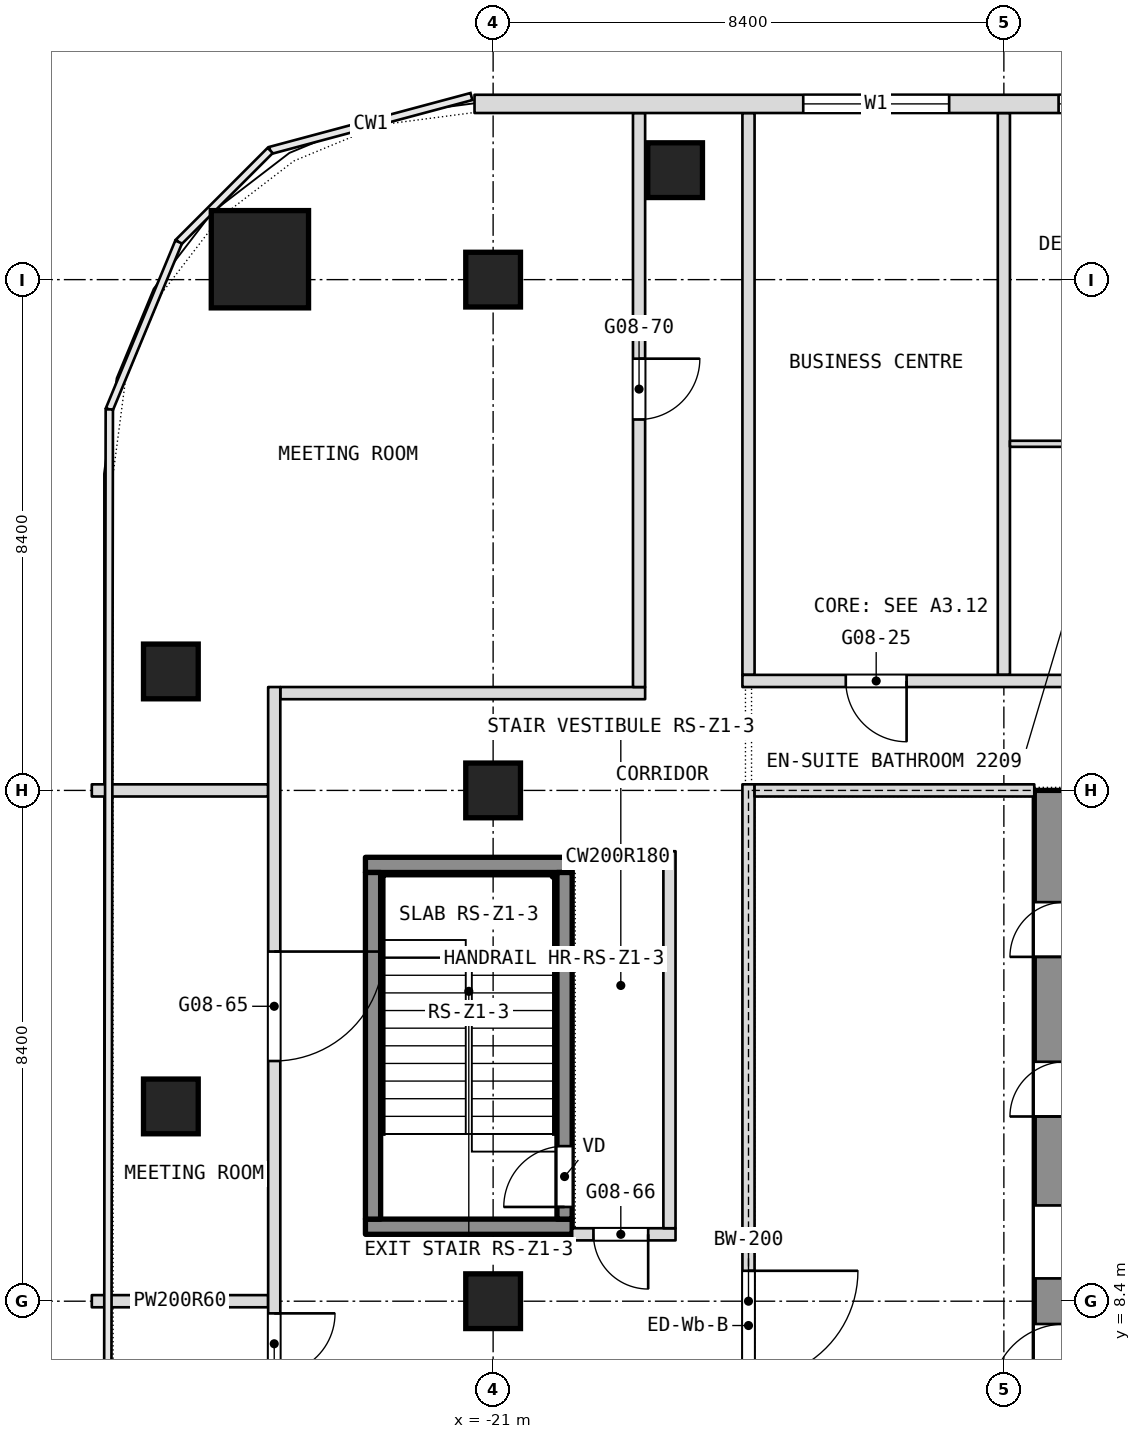
"""IFC4 building model, lengths in metres.
Left out: names, types, materials, properties, quantities, classifications, styles, units other than length and angle.
Written with IfcOpenShell. Run it as: python <this file> out.ifc"""

import sys

from ifc_helpers import new_model, si_unit, direction, frame, frame_2d, origin, origin_2d, place, context, subcontext, project, spatial, rectangle, extrude, element, fill, save


model = new_model("IFC4")
c1 = context("Model", 3, precision=1e-05, world=origin(), true_north=direction((0.0, 1.0)))
c2 = subcontext(c1, "Body", "Model", "MODEL_VIEW")
j1 = project(units=[si_unit("LENGTHUNIT", "METRE"), si_unit("PLANEANGLEUNIT", "RADIAN")], contexts=[c1])
p1 = place(None, origin())
s1 = spatial("IfcSite", under=j1, at=p1, CompositionType="ELEMENT")
p2 = place(p1, origin())
s2 = spatial("IfcBuilding", under=s1, at=p2, CompositionType="ELEMENT")
p3 = place(p2, frame((0.0, 0.0, 104.9)))
s3 = spatial("IfcBuildingStorey", under=s2, at=p3, CompositionType="ELEMENT", Elevation=104.9)
p4 = place(p3, frame((-11.6, 0.0, 0.0), z_axis=(0.0, 0.0, 1.0), x_axis=(0.0, 1.0, 0.0)))
e1 = element("IfcWall", 1, at=p4, inside=s3, PredefinedType="SHEAR", context=c2, shape_type="SweptSolid", body=[
    extrude(rectangle(XDim=16.8, YDim=1.0, at=frame_2d((8.4, 0.0))), origin(), (0.0, 0.0, 1.0), 3.6),
])
p5 = place(p4, frame((3.6, 0.0, 0.0)))
e2 = element("IfcOpeningElement", 2, at=p5, cuts=e1, PredefinedType="OPENING", context=c2, shape_type="SweptSolid", body=[
    extrude(rectangle(XDim=0.9, YDim=2.1, at=frame_2d((0.45, 1.05))), frame((0.0, 0.5, 0.0), z_axis=(0.0, -1.0, 0.0), x_axis=(1.0, 0.0, 0.0)), (0.0, 0.0, 1.0), 1.0),
])
p6 = place(p4, frame((6.825, 0.0, 0.0)))
e3 = element("IfcOpeningElement", 3, at=p6, cuts=e1, PredefinedType="OPENING", context=c2, shape_type="SweptSolid", body=[
    extrude(rectangle(XDim=1.2, YDim=2.1, at=frame_2d((0.6, 1.05))), frame((0.0, 0.5, 0.0), z_axis=(0.0, -1.0, 0.0), x_axis=(1.0, 0.0, 0.0)), (0.0, 0.0, 1.0), 1.0),
])
p7 = place(p4, frame((14.062, 0.0, 0.0)))
e4 = element("IfcOpeningElement", 4, at=p7, cuts=e1, PredefinedType="OPENING", context=c2, shape_type="SweptSolid", body=[
    extrude(rectangle(XDim=0.9, YDim=2.1, at=frame_2d((0.45, 1.05))), frame((0.0, 0.5, 0.0), z_axis=(0.0, -1.0, 0.0), x_axis=(1.0, 0.0, 0.0)), (0.0, 0.0, 1.0), 1.0),
])
p8 = place(p4, frame((11.438, 0.0, 0.0)))
e5 = element("IfcOpeningElement", 5, at=p8, cuts=e1, PredefinedType="OPENING", context=c2, shape_type="SweptSolid", body=[
    extrude(rectangle(XDim=0.9, YDim=2.1, at=frame_2d((0.45, 1.05))), frame((0.0, 0.5, 0.0), z_axis=(0.0, -1.0, 0.0), x_axis=(1.0, 0.0, 0.0)), (0.0, 0.0, 1.0), 1.0),
])
p9 = place(p4, frame((8.775, 0.0, 0.0)))
e6 = element("IfcOpeningElement", 6, at=p9, cuts=e1, PredefinedType="OPENING", context=c2, shape_type="SweptSolid", body=[
    extrude(rectangle(XDim=1.2, YDim=2.1, at=frame_2d((0.6, 1.05))), frame((0.0, 0.5, 0.0), z_axis=(0.0, -1.0, 0.0), x_axis=(1.0, 0.0, 0.0)), (0.0, 0.0, 1.0), 1.0),
])
p10 = place(p3, frame((-24.835, 25.535, 0.0), z_axis=(0.0, 0.0, 1.0), x_axis=(1.0, 0.0, 0.0)))
e7 = element("IfcColumn", 7, at=p10, inside=s3, PredefinedType="COLUMN", context=c2, shape_type="SweptSolid", body=[
    extrude(rectangle(XDim=1.6, YDim=1.6, at=origin_2d()), origin(), (0.0, 0.0, 1.0), 3.6),
])
for number, where, z_axis, x_axis in (
    (8, (-21.0, 8.4, 0.0), (0.0, 0.0, 1.0), (1.0, 0.0, 0.0)),
    (9, (-21.0, 16.8, 0.0), (0.0, 0.0, 1.0), (1.0, 0.0, 0.0)),
    (10, (-21.0, 25.2, 0.0), (0.0, 0.0, 1.0), (1.0, 0.0, 0.0)),
    (11, (-26.3, 11.603, 0.0), (0.0, 0.0, 1.0), (1.0, 0.0, 0.0)),
    (12, (-26.3, 18.756, 0.0), (0.0, 0.0, 1.0), (1.0, 0.0, 0.0)),
    (13, (-18.007, 27.0, 0.0), (0.0, 0.0, 1.0), (1.0, 0.0, 0.0)),
):
    element("IfcColumn", number, at=place(p3, frame(where, z_axis=z_axis, x_axis=x_axis)), inside=s3, PredefinedType="COLUMN", context=c2, shape_type="SweptSolid", body=[
        extrude(rectangle(XDim=0.9, YDim=0.9, at=origin_2d()), origin(), (0.0, 0.0, 1.0), 3.6),
    ])
p11 = place(p3, frame((-27.6, 8.4, 0.0), z_axis=(0.0, 0.0, 1.0), x_axis=(1.0, 0.0, 0.0)))
e14 = element("IfcWall", 14, at=p11, inside=s3, PredefinedType="PARTITIONING", context=c2, shape_type="SweptSolid", body=[
    extrude(rectangle(XDim=2.9, YDim=0.2, at=frame_2d((1.45, 0.0))), origin(), (0.0, 0.0, 1.0), 2.89),
])
p12 = place(p3, frame((-19.7, 9.5, 0.0), z_axis=(0.0, 0.0, 1.0), x_axis=(1.0, 0.0, 0.0)))
e15 = element("IfcWall", 15, at=p12, inside=s3, PredefinedType="PARTITIONING", context=c2, shape_type="SweptSolid", body=[
    extrude(rectangle(XDim=1.7, YDim=0.2, at=frame_2d((0.85, 0.0))), origin(), (0.0, 0.0, 1.0), 3.34),
])
p13 = place(p12, frame((0.35, 0.0, 0.0)))
e16 = element("IfcOpeningElement", 16, at=p13, cuts=e15, PredefinedType="OPENING", context=c2, shape_type="SweptSolid", body=[
    extrude(rectangle(XDim=0.9, YDim=2.1, at=frame_2d((0.45, 1.05))), frame((0.0, 0.1, 0.0), z_axis=(0.0, -1.0, 0.0), x_axis=(1.0, 0.0, 0.0)), (0.0, 0.0, 1.0), 0.2),
])
p14 = place(p3, frame((-12.6, 18.7, 0.0), z_axis=(0.0, 0.0, 1.0), x_axis=(0.0, 1.0, 0.0)))
e17 = element("IfcWall", 17, at=p14, inside=s3, PredefinedType="PARTITIONING", context=c2, shape_type="SweptSolid", body=[
    extrude(rectangle(XDim=9.24, YDim=0.2, at=frame_2d((4.62, 0.0))), origin(), (0.0, 0.0, 1.0), 3.34),
])
p15 = place(p3, frame((-19.7, 15.7, 0.0), z_axis=(0.0, 0.0, 1.0), x_axis=(1.0, 0.0, 0.0)))
e18 = element("IfcWall", 18, at=p15, inside=s3, PredefinedType="PARTITIONING", context=c2, shape_type="SweptSolid", body=[
    extrude(rectangle(XDim=1.5, YDim=0.2, at=frame_2d((0.75, 0.0))), origin(), (0.0, 0.0, 1.0), 3.34),
])
p16 = place(p3, frame((-16.8, 18.7, 0.0), z_axis=(0.0, 0.0, 1.0), x_axis=(0.0, 1.0, 0.0)))
e19 = element("IfcWall", 19, at=p16, inside=s3, PredefinedType="PARTITIONING", context=c2, shape_type="SweptSolid", body=[
    extrude(rectangle(XDim=9.24, YDim=0.2, at=frame_2d((4.62, 0.0))), origin(), (0.0, 0.0, 1.0), 3.34),
])
p17 = place(p3, frame((-27.6, 16.8, 0.0), z_axis=(0.0, 0.0, 1.0), x_axis=(1.0, 0.0, 0.0)))
e20 = element("IfcWall", 20, at=p17, inside=s3, PredefinedType="PARTITIONING", context=c2, shape_type="SweptSolid", body=[
    extrude(rectangle(XDim=2.9, YDim=0.2, at=frame_2d((1.45, 0.0))), origin(), (0.0, 0.0, 1.0), 2.89),
])
p18 = place(p3, frame((-18.1, 9.6, 0.0), z_axis=(0.0, 0.0, 1.0), x_axis=(0.0, 1.0, 0.0)))
e21 = element("IfcWall", 21, at=p18, inside=s3, PredefinedType="PARTITIONING", context=c2, shape_type="SweptSolid", body=[
    extrude(rectangle(XDim=6.2, YDim=0.2, at=frame_2d((3.1, 0.0))), origin(), (0.0, 0.0, 1.0), 3.34),
])
p19 = place(p3, frame((-24.5, 18.4, 0.0), z_axis=(0.0, 0.0, 1.0), x_axis=(1.0, 0.0, 0.0)))
e22 = element("IfcWall", 22, at=p19, inside=s3, PredefinedType="PARTITIONING", context=c2, shape_type="SweptSolid", body=[
    extrude(rectangle(XDim=6.0, YDim=0.2, at=frame_2d((3.0, 0.0))), origin(), (0.0, 0.0, 1.0), 3.34),
])
p20 = place(p3, frame((-18.6, 18.5, 0.0), z_axis=(0.0, 0.0, 1.0), x_axis=(0.0, 1.0, 0.0)))
e23 = element("IfcWall", 23, at=p20, inside=s3, PredefinedType="PARTITIONING", context=c2, shape_type="SweptSolid", body=[
    extrude(rectangle(XDim=9.44, YDim=0.2, at=frame_2d((4.72, 0.0))), origin(), (0.0, 0.0, 1.0), 3.34),
])
p21 = place(p20, frame((4.4, 0.0, 0.0)))
e24 = element("IfcOpeningElement", 24, at=p21, cuts=e23, PredefinedType="OPENING", context=c2, shape_type="SweptSolid", body=[
    extrude(rectangle(XDim=1.0, YDim=2.1, at=frame_2d((0.5, 1.05))), frame((0.0, 0.1, 0.0), z_axis=(0.0, -1.0, 0.0), x_axis=(1.0, 0.0, 0.0)), (0.0, 0.0, 1.0), 0.2),
])
p22 = place(p3, frame((-16.9, 18.6, 0.0), z_axis=(0.0, 0.0, 1.0), x_axis=(1.0, 0.0, 0.0)))
e25 = element("IfcWall", 25, at=p22, inside=s3, PredefinedType="PARTITIONING", context=c2, shape_type="SweptSolid", body=[
    extrude(rectangle(XDim=18.4, YDim=0.2, at=frame_2d((9.2, 0.0))), origin(), (0.0, 0.0, 1.0), 3.34),
])
p23 = place(p22, frame((1.7, 0.0, 0.0)))
e26 = element("IfcOpeningElement", 26, at=p23, cuts=e25, PredefinedType="OPENING", context=c2, shape_type="SweptSolid", body=[
    extrude(rectangle(XDim=1.0, YDim=2.1, at=frame_2d((0.5, 1.05))), frame((0.0, 0.1, 0.0), z_axis=(0.0, -1.0, 0.0), x_axis=(1.0, 0.0, 0.0)), (0.0, 0.0, 1.0), 0.2),
])
p24 = place(p22, frame((7.1, 0.0, 0.0)))
e27 = element("IfcOpeningElement", 27, at=p24, cuts=e25, PredefinedType="OPENING", context=c2, shape_type="SweptSolid", body=[
    extrude(rectangle(XDim=1.0, YDim=2.1, at=frame_2d((0.5, 1.05))), frame((0.0, 0.1, 0.0), z_axis=(0.0, -1.0, 0.0), x_axis=(1.0, 0.0, 0.0)), (0.0, 0.0, 1.0), 0.2),
])
p25 = place(p22, frame((8.9, 0.0, 0.0)))
e28 = element("IfcOpeningElement", 28, at=p25, cuts=e25, PredefinedType="OPENING", context=c2, shape_type="SweptSolid", body=[
    extrude(rectangle(XDim=1.0, YDim=2.1, at=frame_2d((0.5, 1.05))), frame((0.0, 0.1, 0.0), z_axis=(0.0, -1.0, 0.0), x_axis=(1.0, 0.0, 0.0)), (0.0, 0.0, 1.0), 0.2),
])
p26 = place(p22, frame((13.1, 0.0, 0.0)))
e29 = element("IfcOpeningElement", 29, at=p26, cuts=e25, PredefinedType="OPENING", context=c2, shape_type="SweptSolid", body=[
    extrude(rectangle(XDim=1.0, YDim=2.1, at=frame_2d((0.5, 1.05))), frame((0.0, 0.1, 0.0), z_axis=(0.0, -1.0, 0.0), x_axis=(1.0, 0.0, 0.0)), (0.0, 0.0, 1.0), 0.2),
])
p27 = place(p3, frame((-12.5, 22.5, 0.0), z_axis=(0.0, 0.0, 1.0), x_axis=(1.0, 0.0, 0.0)))
e30 = element("IfcWall", 30, at=p27, inside=s3, PredefinedType="PARTITIONING", context=c2, shape_type="SweptSolid", body=[
    extrude(rectangle(XDim=2.25, YDim=0.1, at=frame_2d((1.125, 0.0))), origin(), (0.0, 0.0, 1.0), 3.34),
])
p28 = place(p27, frame((1.2, 0.0, 0.0)))
e31 = element("IfcOpeningElement", 31, at=p28, cuts=e30, PredefinedType="OPENING", context=c2, shape_type="SweptSolid", body=[
    extrude(rectangle(XDim=0.9, YDim=2.1, at=frame_2d((0.45, 1.05))), frame((0.0, 0.05, 0.0), z_axis=(0.0, -1.0, 0.0), x_axis=(1.0, 0.0, 0.0)), (0.0, 0.0, 1.0), 0.1),
])
p29 = place(p3, frame((-24.6, 6.9, 0.0), z_axis=(0.0, 0.0, 1.0), x_axis=(0.0, 1.0, 0.0)))
e32 = element("IfcWall", 32, at=p29, inside=s3, PredefinedType="PARTITIONING", context=c2, shape_type="SweptSolid", body=[
    extrude(rectangle(XDim=11.6, YDim=0.2, at=frame_2d((5.8, 0.0))), origin(), (0.0, 0.0, 1.0), 3.34),
])
p30 = place(p29, frame((5.45, 0.0, 0.0)))
e33 = element("IfcOpeningElement", 33, at=p30, cuts=e32, PredefinedType="OPENING", context=c2, shape_type="SweptSolid", body=[
    extrude(rectangle(XDim=1.8, YDim=2.1, at=frame_2d((0.9, 1.05))), frame((0.0, 0.1, 0.0), z_axis=(0.0, -1.0, 0.0), x_axis=(1.0, 0.0, 0.0)), (0.0, 0.0, 1.0), 0.2),
])
p31 = place(p29, frame((0.3, 0.0, 0.0)))
e34 = element("IfcOpeningElement", 34, at=p31, cuts=e32, PredefinedType="OPENING", context=c2, shape_type="SweptSolid", body=[
    extrude(rectangle(XDim=1.0, YDim=2.1, at=frame_2d((0.5, 1.05))), frame((0.0, 0.1, 0.0), z_axis=(0.0, -1.0, 0.0), x_axis=(1.0, 0.0, 0.0)), (0.0, 0.0, 1.0), 0.2),
])
p32 = place(p3, frame((21.306, 28.09, 0.0), z_axis=(0.0, 0.0, 1.0), x_axis=(-1.0, 0.0, 0.0)))
e35 = element("IfcWall", 35, at=p32, inside=s3, PredefinedType="NOTDEFINED", context=c2, shape_type="SweptSolid", body=[
    extrude(rectangle(XDim=42.612, YDim=0.3, at=frame_2d((21.306, 0.0))), origin(), (0.0, 0.0, 1.0), 3.6),
])
p33 = place(p32, frame((5.406, 0.0, 0.9)))
e36 = element("IfcOpeningElement", 36, at=p33, cuts=e35, PredefinedType="OPENING", context=c2, shape_type="SweptSolid", body=[
    extrude(rectangle(XDim=2.4, YDim=2.1, at=frame_2d((1.2, 1.05))), frame((0.0, 0.15, 0.0), z_axis=(0.0, -1.0, 0.0), x_axis=(1.0, 0.0, 0.0)), (0.0, 0.0, 1.0), 0.3),
])
p34 = place(p32, frame((9.606, 0.0, 0.9)))
e37 = element("IfcOpeningElement", 37, at=p34, cuts=e35, PredefinedType="OPENING", context=c2, shape_type="SweptSolid", body=[
    extrude(rectangle(XDim=2.4, YDim=2.1, at=frame_2d((1.2, 1.05))), frame((0.0, 0.15, 0.0), z_axis=(0.0, -1.0, 0.0), x_axis=(1.0, 0.0, 0.0)), (0.0, 0.0, 1.0), 0.3),
])
p35 = place(p32, frame((13.806, 0.0, 0.9)))
e38 = element("IfcOpeningElement", 38, at=p35, cuts=e35, PredefinedType="OPENING", context=c2, shape_type="SweptSolid", body=[
    extrude(rectangle(XDim=2.4, YDim=2.1, at=frame_2d((1.2, 1.05))), frame((0.0, 0.15, 0.0), z_axis=(0.0, -1.0, 0.0), x_axis=(1.0, 0.0, 0.0)), (0.0, 0.0, 1.0), 0.3),
])
p36 = place(p32, frame((18.006, 0.0, 0.9)))
e39 = element("IfcOpeningElement", 39, at=p36, cuts=e35, PredefinedType="OPENING", context=c2, shape_type="SweptSolid", body=[
    extrude(rectangle(XDim=2.4, YDim=2.1, at=frame_2d((1.2, 1.05))), frame((0.0, 0.15, 0.0), z_axis=(0.0, -1.0, 0.0), x_axis=(1.0, 0.0, 0.0)), (0.0, 0.0, 1.0), 0.3),
])
p37 = place(p32, frame((22.206, 0.0, 0.9)))
e40 = element("IfcOpeningElement", 40, at=p37, cuts=e35, PredefinedType="OPENING", context=c2, shape_type="SweptSolid", body=[
    extrude(rectangle(XDim=2.4, YDim=2.1, at=frame_2d((1.2, 1.05))), frame((0.0, 0.15, 0.0), z_axis=(0.0, -1.0, 0.0), x_axis=(1.0, 0.0, 0.0)), (0.0, 0.0, 1.0), 0.3),
])
p38 = place(p32, frame((26.406, 0.0, 0.9)))
e41 = element("IfcOpeningElement", 41, at=p38, cuts=e35, PredefinedType="OPENING", context=c2, shape_type="SweptSolid", body=[
    extrude(rectangle(XDim=2.4, YDim=2.1, at=frame_2d((1.2, 1.05))), frame((0.0, 0.15, 0.0), z_axis=(0.0, -1.0, 0.0), x_axis=(1.0, 0.0, 0.0)), (0.0, 0.0, 1.0), 0.3),
])
p39 = place(p32, frame((30.606, 0.0, 0.9)))
e42 = element("IfcOpeningElement", 42, at=p39, cuts=e35, PredefinedType="OPENING", context=c2, shape_type="SweptSolid", body=[
    extrude(rectangle(XDim=2.4, YDim=2.1, at=frame_2d((1.2, 1.05))), frame((0.0, 0.15, 0.0), z_axis=(0.0, -1.0, 0.0), x_axis=(1.0, 0.0, 0.0)), (0.0, 0.0, 1.0), 0.3),
])
p40 = place(p32, frame((34.806, 0.0, 0.9)))
e43 = element("IfcOpeningElement", 43, at=p40, cuts=e35, PredefinedType="OPENING", context=c2, shape_type="SweptSolid", body=[
    extrude(rectangle(XDim=2.4, YDim=2.1, at=frame_2d((1.2, 1.05))), frame((0.0, 0.15, 0.0), z_axis=(0.0, -1.0, 0.0), x_axis=(1.0, 0.0, 0.0)), (0.0, 0.0, 1.0), 0.3),
])
p41 = place(p3, frame((-16.8, -0.1, 0.0), z_axis=(0.0, 0.0, 1.0), x_axis=(0.0, 1.0, 0.0)))
e44 = element("IfcWall", 44, at=p41, inside=s3, PredefinedType="PARTITIONING", context=c2, shape_type="SweptSolid", body=[
    extrude(rectangle(XDim=17.0, YDim=0.2, at=frame_2d((8.5, 0.0))), origin(), (0.0, 0.0, 1.0), 3.34),
])
p42 = place(p41, frame((2.2, 0.0, 0.0)))
e45 = element("IfcOpeningElement", 45, at=p42, cuts=e44, PredefinedType="OPENING", context=c2, shape_type="SweptSolid", body=[
    extrude(rectangle(XDim=1.8, YDim=2.1, at=frame_2d((0.9, 1.05))), frame((0.0, 0.1, 0.0), z_axis=(0.0, -1.0, 0.0), x_axis=(1.0, 0.0, 0.0)), (0.0, 0.0, 1.0), 0.2),
])
p43 = place(p41, frame((7.2, 0.0, 0.0)))
e46 = element("IfcOpeningElement", 46, at=p43, cuts=e44, PredefinedType="OPENING", context=c2, shape_type="SweptSolid", body=[
    extrude(rectangle(XDim=1.8, YDim=2.1, at=frame_2d((0.9, 1.05))), frame((0.0, 0.1, 0.0), z_axis=(0.0, -1.0, 0.0), x_axis=(1.0, 0.0, 0.0)), (0.0, 0.0, 1.0), 0.2),
])
p44 = place(p3, frame((-16.7, 16.8, 0.0), z_axis=(0.0, 0.0, 1.0), x_axis=(1.0, 0.0, 0.0)))
e47 = element("IfcWall", 47, at=p44, inside=s3, PredefinedType="PARTITIONING", context=c2, shape_type="SweptSolid", body=[
    extrude(rectangle(XDim=4.6, YDim=0.2, at=frame_2d((2.3, 0.0))), origin(), (0.0, 0.0, 1.0), 2.89),
])
for number, where, z_axis, x_axis in (
    (48, (-23.1, 9.625, 0.1), (0.0, 0.0, 1.0), (1.0, 0.0, 0.0)),
    (49, (-23.1, 15.575, 0.1), (0.0, 0.0, 1.0), (1.0, 0.0, 0.0)),
):
    element("IfcWall", number, at=place(p3, frame(where, z_axis=z_axis, x_axis=x_axis)), inside=s3, PredefinedType="SHEAR", context=c2, shape_type="SweptSolid", body=[
        extrude(rectangle(XDim=3.4, YDim=0.25, at=frame_2d((1.7, 0.0))), origin(), (0.0, 0.0, 1.0), 3.6),
    ])
p45 = place(p3, frame((-22.975, 9.75, 0.1), z_axis=(0.0, 0.0, 1.0), x_axis=(0.0, 1.0, 0.0)))
e50 = element("IfcWall", 50, at=p45, inside=s3, PredefinedType="SHEAR", context=c2, shape_type="SweptSolid", body=[
    extrude(rectangle(XDim=5.7, YDim=0.25, at=frame_2d((2.85, 0.0))), origin(), (0.0, 0.0, 1.0), 3.6),
])
p46 = place(p3, frame((-19.825, 9.75, 0.1), z_axis=(0.0, 0.0, 1.0), x_axis=(0.0, 1.0, 0.0)))
e51 = element("IfcWall", 51, at=p46, inside=s3, PredefinedType="SHEAR", context=c2, shape_type="SweptSolid", body=[
    extrude(rectangle(XDim=5.7, YDim=0.25, at=frame_2d((2.85, 0.0))), origin(), (0.0, 0.0, 1.0), 3.6),
])
p47 = place(p46, frame((0.2, 0.0, 0.0)))
e52 = element("IfcOpeningElement", 52, at=p47, cuts=e51, PredefinedType="OPENING", context=c2, shape_type="SweptSolid", body=[
    extrude(rectangle(XDim=1.0, YDim=2.1, at=frame_2d((0.5, 1.05))), frame((0.0, 0.125, 0.0), z_axis=(0.0, -1.0, 0.0), x_axis=(1.0, 0.0, 0.0)), (0.0, 0.0, 1.0), 0.25),
])
p48 = place(p13, origin())
e53 = element("IfcDoor", 53, at=p48, inside=s3, OperationType="SINGLE_SWING_RIGHT", PredefinedType="DOOR", context=c2, shape_type="SweptSolid", body=[
    extrude(rectangle(XDim=0.9, YDim=2.1, at=frame_2d((0.45, 1.05))), frame((0.0, 0.025, 0.0), z_axis=(0.0, -1.0, 0.0), x_axis=(1.0, 0.0, 0.0)), (0.0, 0.0, 1.0), 0.05),
])
fill(e16, e53)
p49 = place(p21, origin())
e54 = element("IfcDoor", 54, at=p49, inside=s3, OperationType="SINGLE_SWING_RIGHT", PredefinedType="DOOR", context=c2, shape_type="SweptSolid", body=[
    extrude(rectangle(XDim=1.0, YDim=2.1, at=frame_2d((0.5, 1.05))), frame((0.0, 0.025, 0.0), z_axis=(0.0, -1.0, 0.0), x_axis=(1.0, 0.0, 0.0)), (0.0, 0.0, 1.0), 0.05),
])
fill(e24, e54)
p50 = place(p23, origin())
e55 = element("IfcDoor", 55, at=p50, inside=s3, OperationType="SINGLE_SWING_RIGHT", PredefinedType="DOOR", context=c2, shape_type="SweptSolid", body=[
    extrude(rectangle(XDim=1.0, YDim=2.1, at=frame_2d((0.5, 1.05))), frame((0.0, 0.025, 0.0), z_axis=(0.0, -1.0, 0.0), x_axis=(1.0, 0.0, 0.0)), (0.0, 0.0, 1.0), 0.05),
])
fill(e26, e55)
p51 = place(p30, origin())
e56 = element("IfcDoor", 56, at=p51, inside=s3, OperationType="DOUBLE_DOOR_SINGLE_SWING", PredefinedType="DOOR", context=c2, shape_type="SweptSolid", body=[
    extrude(rectangle(XDim=1.8, YDim=2.1, at=frame_2d((0.9, 1.05))), frame((0.0, 0.025, 0.0), z_axis=(0.0, -1.0, 0.0), x_axis=(1.0, 0.0, 0.0)), (0.0, 0.0, 1.0), 0.05),
])
fill(e33, e56)
p52 = place(p31, origin())
e57 = element("IfcDoor", 57, at=p52, inside=s3, OperationType="SINGLE_SWING_LEFT", PredefinedType="DOOR", context=c2, shape_type="SweptSolid", body=[
    extrude(rectangle(XDim=1.0, YDim=2.1, at=frame_2d((0.5, 1.05))), frame((0.0, 0.025, 0.0), z_axis=(0.0, -1.0, 0.0), x_axis=(1.0, 0.0, 0.0)), (0.0, 0.0, 1.0), 0.05),
])
fill(e34, e57)
p53 = place(p39, origin())
e58 = element("IfcWindow", 58, at=p53, inside=s3, PartitioningType="SINGLE_PANEL", PredefinedType="WINDOW", context=c2, shape_type="SweptSolid", body=[
    extrude(rectangle(XDim=2.4, YDim=2.1, at=frame_2d((1.2, 1.05))), frame((0.0, 0.03, 0.0), z_axis=(0.0, -1.0, 0.0), x_axis=(1.0, 0.0, 0.0)), (0.0, 0.0, 1.0), 0.06),
])
fill(e42, e58)
p54 = place(p40, origin())
e59 = element("IfcWindow", 59, at=p54, inside=s3, PartitioningType="SINGLE_PANEL", PredefinedType="WINDOW", context=c2, shape_type="SweptSolid", body=[
    extrude(rectangle(XDim=2.4, YDim=2.1, at=frame_2d((1.2, 1.05))), frame((0.0, 0.03, 0.0), z_axis=(0.0, -1.0, 0.0), x_axis=(1.0, 0.0, 0.0)), (0.0, 0.0, 1.0), 0.06),
])
fill(e43, e59)
p55 = place(p47, origin())
e60 = element("IfcDoor", 60, at=p55, inside=s3, OperationType="SINGLE_SWING_LEFT", PredefinedType="DOOR", context=c2, shape_type="SweptSolid", body=[
    extrude(rectangle(XDim=1.0, YDim=2.1, at=frame_2d((0.5, 1.05))), frame((0.0, 0.025, 0.0), z_axis=(0.0, -1.0, 0.0), x_axis=(1.0, 0.0, 0.0)), (0.0, 0.0, 1.0), 0.05),
])
fill(e52, e60)
p56 = place(p43, origin())
e61 = element("IfcDoor", 61, at=p56, inside=s3, OperationType="DOUBLE_DOOR_SINGLE_SWING", PredefinedType="DOOR", context=c2, shape_type="SweptSolid", body=[
    extrude(rectangle(XDim=1.8, YDim=2.1, at=frame_2d((0.9, 1.05))), frame((0.0, 0.025, 0.0), z_axis=(0.0, -1.0, 0.0), x_axis=(1.0, 0.0, 0.0)), (0.0, 0.0, 1.0), 0.05),
])
fill(e46, e61)
save(model, sys.argv[1])
